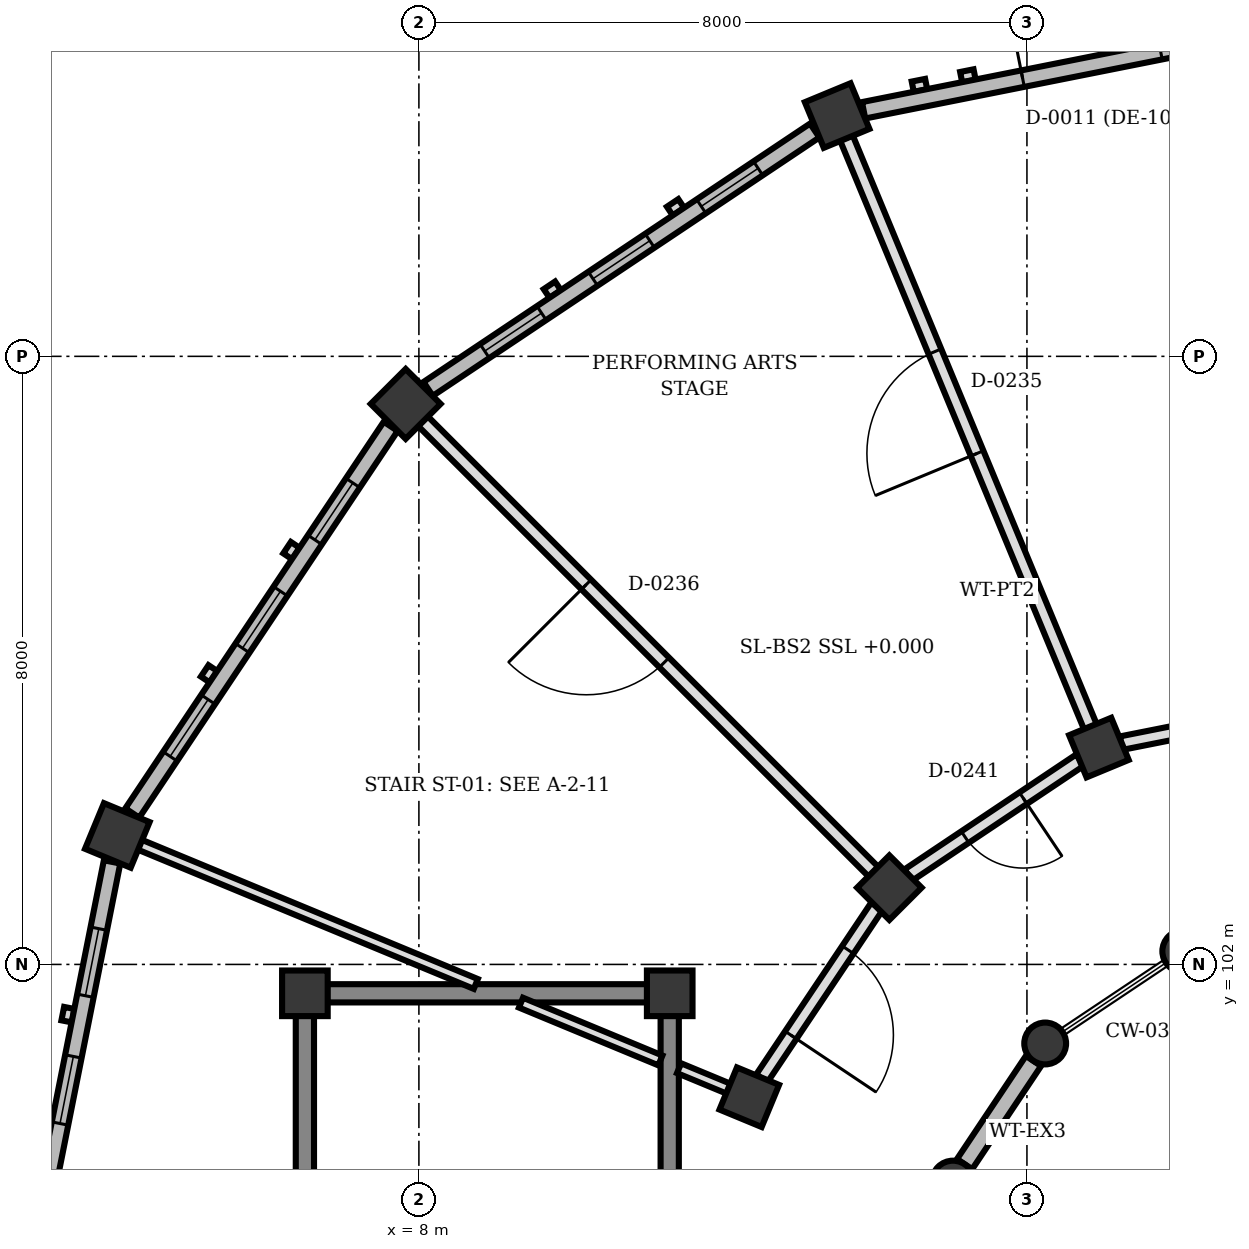
"""IFC4 building model, lengths in metres.
Left out: names, types, materials, properties, quantities, classifications, styles, units other than length and angle.
Written with IfcOpenShell. Run it as: python <this file> out.ifc"""

import sys

from ifc_helpers import new_model, si_unit, direction, frame, frame_2d, origin, origin_2d, place, context, subcontext, project, spatial, rectangle, circle, extrude, element, fill, save


model = new_model("IFC4")
c1 = context("Model", 3, precision=1e-05, world=origin(), true_north=direction((0.0, 1.0)))
c2 = subcontext(c1, "Body", "Model", "MODEL_VIEW")
j1 = project(units=[si_unit("LENGTHUNIT", "METRE"), si_unit("PLANEANGLEUNIT", "RADIAN")], contexts=[c1])
p1 = place(None, origin())
s1 = spatial("IfcSite", under=j1, at=p1, CompositionType="ELEMENT")
p2 = place(p1, origin())
s2 = spatial("IfcBuilding", under=s1, at=p2, CompositionType="ELEMENT")
p3 = place(p2, origin())
s3 = spatial("IfcBuildingStorey", under=s2, at=p3, CompositionType="ELEMENT", Elevation=0.0)
for number, where, z_axis, x_axis in (
    (1, (11.3, 101.62, 0.0), (0.0, 0.0, 1.0), (1.0, 0.0, 0.0)),
    (2, (6.5, 101.62, 0.0), (0.0, 0.0, 1.0), (1.0, 0.0, 0.0)),
):
    element("IfcColumn", number, at=place(p3, frame(where, z_axis=z_axis, x_axis=x_axis)), inside=s3, PredefinedType="COLUMN", context=c2, shape_type="SweptSolid", body=[
        extrude(rectangle(XDim=0.6, YDim=0.6, at=origin_2d()), origin(), (0.0, 0.0, 1.0), 4.5),
    ])
for number, where, z_axis, x_axis in (
    (3, (18.057, 102.174, 0.0), (0.0, 0.0, 1.0), (1.0, 0.0, 0.0)),
    (4, (16.24, 100.96, 0.0), (0.0, 0.0, 1.0), (1.0, 0.0, 0.0)),
    (5, (15.026, 99.143, 0.0), (0.0, 0.0, 1.0), (1.0, 0.0, 0.0)),
):
    element("IfcColumn", number, at=place(p3, frame(where, z_axis=z_axis, x_axis=x_axis)), inside=s3, PredefinedType="COLUMN", context=c2, shape_type="SweptSolid", body=[
        extrude(circle(Radius=0.275, at=origin_2d()), origin(), (0.0, 0.0, 1.0), 4.5),
    ])
for number, where, z_axis, x_axis in (
    (6, (16.947, 104.853, 0.0), (0.0, 0.0, 1.0), (-0.383, 0.924, 0.0)),
    (7, (14.19, 103.01, 0.0), (0.0, 0.0, 1.0), (-0.707, 0.707, 0.0)),
    (8, (12.347, 100.253, 0.0), (0.0, 0.0, 1.0), (-0.924, 0.383, 0.0)),
):
    element("IfcColumn", number, at=place(p3, frame(where, z_axis=z_axis, x_axis=x_axis)), inside=s3, PredefinedType="COLUMN", context=c2, shape_type="SweptSolid", body=[
        extrude(rectangle(XDim=0.6, YDim=0.6, at=origin_2d()), origin(), (0.0, 0.0, 1.0), 4.5),
    ])
for number, where, z_axis, x_axis in (
    (9, (13.503, 113.168, 0.0), (0.0, 0.0, 1.0), (-0.383, 0.924, 0.0)),
    (10, (7.826, 109.374, 0.0), (0.0, 0.0, 1.0), (-0.707, 0.707, 0.0)),
    (11, (4.032, 103.697, 0.0), (0.0, 0.0, 1.0), (-0.924, 0.383, 0.0)),
):
    element("IfcColumn", number, at=place(p3, frame(where, z_axis=z_axis, x_axis=x_axis)), inside=s3, PredefinedType="COLUMN", context=c2, shape_type="SweptSolid", body=[
        extrude(rectangle(XDim=0.65, YDim=0.65, at=origin_2d()), origin(), (0.0, 0.0, 1.0), 4.5),
    ])
p4 = place(p3, frame((13.851, 113.237, 0.0), z_axis=(0.0, 0.0, 1.0), x_axis=(0.98077967596, 0.19511849534, 0.0)))
e12 = element("IfcWall", 12, at=p4, inside=s3, PredefinedType="SOLIDWALL", context=c2, shape_type="SweptSolid", body=[
    extrude(rectangle(XDim=6.119, YDim=0.22, at=frame_2d((3.059, 0.0))), origin(), (0.0, 0.0, 1.0), 3.55),
])
p5 = place(p4, frame((2.134, 0.0, 0.0)))
e13 = element("IfcOpeningElement", 13, at=p5, cuts=e12, PredefinedType="OPENING", context=c2, shape_type="SweptSolid", body=[
    extrude(rectangle(XDim=1.85, YDim=2.35, at=frame_2d((0.925, 1.175))), frame((0.0, 0.12, 0.0), z_axis=(0.0, -1.0, 0.0), x_axis=(1.0, 0.0, 0.0)), (0.0, 0.0, 1.0), 0.24),
])
p6 = place(p3, frame((8.121, 109.571, 0.0), z_axis=(0.0, 0.0, 1.0), x_axis=(0.83139901156, 0.555675879967, 0.0)))
e14 = element("IfcWall", 14, at=p6, inside=s3, PredefinedType="SOLIDWALL", context=c2, shape_type="SweptSolid", body=[
    extrude(rectangle(XDim=6.118, YDim=0.22, at=frame_2d((3.059, 0.0))), origin(), (0.0, 0.0, 1.0), 3.55),
])
p7 = place(p6, frame((0.896, 0.0, 0.85)))
e15 = element("IfcOpeningElement", 15, at=p7, cuts=e14, PredefinedType="OPENING", context=c2, shape_type="SweptSolid", body=[
    extrude(rectangle(XDim=0.9, YDim=1.4, at=frame_2d((0.45, 0.7))), frame((0.0, 0.12, 0.0), z_axis=(0.0, -1.0, 0.0), x_axis=(1.0, 0.0, 0.0)), (0.0, 0.0, 1.0), 0.24),
])
p8 = place(p6, frame((2.609, 0.0, 0.85)))
e16 = element("IfcOpeningElement", 16, at=p8, cuts=e14, PredefinedType="OPENING", context=c2, shape_type="SweptSolid", body=[
    extrude(rectangle(XDim=0.9, YDim=1.4, at=frame_2d((0.45, 0.7))), frame((0.0, 0.12, 0.0), z_axis=(0.0, -1.0, 0.0), x_axis=(1.0, 0.0, 0.0)), (0.0, 0.0, 1.0), 0.24),
])
p9 = place(p6, frame((4.323, 0.0, 0.85)))
e17 = element("IfcOpeningElement", 17, at=p9, cuts=e14, PredefinedType="OPENING", context=c2, shape_type="SweptSolid", body=[
    extrude(rectangle(XDim=0.9, YDim=1.4, at=frame_2d((0.45, 0.7))), frame((0.0, 0.12, 0.0), z_axis=(0.0, -1.0, 0.0), x_axis=(1.0, 0.0, 0.0)), (0.0, 0.0, 1.0), 0.24),
])
p10 = place(p3, frame((4.229, 103.992, 0.0), z_axis=(0.0, 0.0, 1.0), x_axis=(0.555657446161, 0.831411331728, 0.0)))
e18 = element("IfcWall", 18, at=p10, inside=s3, PredefinedType="SOLIDWALL", context=c2, shape_type="SweptSolid", body=[
    extrude(rectangle(XDim=6.119, YDim=0.22, at=frame_2d((3.059, 0.0))), origin(), (0.0, 0.0, 1.0), 3.55),
])
p11 = place(p10, frame((0.896, 0.0, 0.85)))
e19 = element("IfcOpeningElement", 19, at=p11, cuts=e18, PredefinedType="OPENING", context=c2, shape_type="SweptSolid", body=[
    extrude(rectangle(XDim=0.9, YDim=1.4, at=frame_2d((0.45, 0.7))), frame((0.0, 0.12, 0.0), z_axis=(0.0, -1.0, 0.0), x_axis=(1.0, 0.0, 0.0)), (0.0, 0.0, 1.0), 0.24),
])
p12 = place(p10, frame((2.609, 0.0, 0.85)))
e20 = element("IfcOpeningElement", 20, at=p12, cuts=e18, PredefinedType="OPENING", context=c2, shape_type="SweptSolid", body=[
    extrude(rectangle(XDim=0.9, YDim=1.4, at=frame_2d((0.45, 0.7))), frame((0.0, 0.12, 0.0), z_axis=(0.0, -1.0, 0.0), x_axis=(1.0, 0.0, 0.0)), (0.0, 0.0, 1.0), 0.24),
])
p13 = place(p10, frame((4.323, 0.0, 0.85)))
e21 = element("IfcOpeningElement", 21, at=p13, cuts=e18, PredefinedType="OPENING", context=c2, shape_type="SweptSolid", body=[
    extrude(rectangle(XDim=0.9, YDim=1.4, at=frame_2d((0.45, 0.7))), frame((0.0, 0.12, 0.0), z_axis=(0.0, -1.0, 0.0), x_axis=(1.0, 0.0, 0.0)), (0.0, 0.0, 1.0), 0.24),
])
p14 = place(p3, frame((16.086, 100.73, 0.0), z_axis=(0.0, 0.0, 1.0), x_axis=(-0.555287078904, -0.83165874011, 0.0)))
e22 = element("IfcWall", 22, at=p14, inside=s3, PredefinedType="SOLIDWALL", context=c2, shape_type="SweptSolid", body=[
    extrude(rectangle(XDim=1.632, YDim=0.24, at=frame_2d((0.816, 0.0))), origin(), (0.0, 0.0, 1.0), 3.55),
])
p15 = place(p3, frame((2.769, 97.348, 0.0), z_axis=(0.0, 0.0, 1.0), x_axis=(0.195110859746, 0.980781194971, 0.0)))
e23 = element("IfcWall", 23, at=p15, inside=s3, PredefinedType="SOLIDWALL", context=c2, shape_type="SweptSolid", body=[
    extrude(rectangle(XDim=6.119, YDim=0.22, at=frame_2d((3.06, 0.0))), origin(), (0.0, 0.0, 1.0), 3.55),
])
p16 = place(p15, frame((0.896, 0.0, 0.85)))
e24 = element("IfcOpeningElement", 24, at=p16, cuts=e23, PredefinedType="OPENING", context=c2, shape_type="SweptSolid", body=[
    extrude(rectangle(XDim=0.9, YDim=1.4, at=frame_2d((0.45, 0.7))), frame((0.0, 0.12, 0.0), z_axis=(0.0, -1.0, 0.0), x_axis=(1.0, 0.0, 0.0)), (0.0, 0.0, 1.0), 0.24),
])
p17 = place(p15, frame((2.609, 0.0, 0.85)))
e25 = element("IfcOpeningElement", 25, at=p17, cuts=e23, PredefinedType="OPENING", context=c2, shape_type="SweptSolid", body=[
    extrude(rectangle(XDim=0.9, YDim=1.4, at=frame_2d((0.45, 0.7))), frame((0.0, 0.12, 0.0), z_axis=(0.0, -1.0, 0.0), x_axis=(1.0, 0.0, 0.0)), (0.0, 0.0, 1.0), 0.24),
])
p18 = place(p15, frame((4.323, 0.0, 0.85)))
e26 = element("IfcOpeningElement", 26, at=p18, cuts=e23, PredefinedType="OPENING", context=c2, shape_type="SweptSolid", body=[
    extrude(rectangle(XDim=0.9, YDim=1.4, at=frame_2d((0.45, 0.7))), frame((0.0, 0.12, 0.0), z_axis=(0.0, -1.0, 0.0), x_axis=(1.0, 0.0, 0.0)), (0.0, 0.0, 1.0), 0.24),
])
p19 = place(p3, frame((6.5, 93.192, 0.0), z_axis=(0.0, 0.0, 1.0), x_axis=(0.0, 1.0, 0.0)))
e27 = element("IfcWall", 27, at=p19, inside=s3, PredefinedType="SHEAR", context=c2, shape_type="SweptSolid", body=[
    extrude(rectangle(XDim=8.136, YDim=0.24, at=frame_2d((4.068, 0.0))), origin(), (0.0, 0.0, 1.0), 4.24),
])
p20 = place(p3, frame((11.3, 101.328, 0.0), z_axis=(0.0, 0.0, 1.0), x_axis=(0.0, -1.0, 0.0)))
e28 = element("IfcWall", 28, at=p20, inside=s3, PredefinedType="SHEAR", context=c2, shape_type="SweptSolid", body=[
    extrude(rectangle(XDim=8.136, YDim=0.24, at=frame_2d((4.068, 0.0))), origin(), (0.0, 0.0, 1.0), 4.24),
])
p21 = place(p20, frame((6.244, 0.0, 0.0)))
e29 = element("IfcOpeningElement", 29, at=p21, cuts=e28, PredefinedType="OPENING", context=c2, shape_type="SweptSolid", body=[
    extrude(rectangle(XDim=0.88, YDim=2.1, at=frame_2d((0.44, 1.05))), frame((0.0, 0.13, 0.0), z_axis=(0.0, -1.0, 0.0), x_axis=(1.0, 0.0, 0.0)), (0.0, 0.0, 1.0), 0.26),
])
p22 = place(p3, frame((11.008, 101.62, 0.0), z_axis=(0.0, 0.0, 1.0), x_axis=(-1.0, 0.0, 0.0)))
e30 = element("IfcWall", 30, at=p22, inside=s3, PredefinedType="SHEAR", context=c2, shape_type="SweptSolid", body=[
    extrude(rectangle(XDim=4.216, YDim=0.24, at=frame_2d((2.108, 0.0))), origin(), (0.0, 0.0, 1.0), 4.24),
])
p23 = place(p3, frame((16.836, 105.123, 0.0), z_axis=(0.0, 0.0, 1.0), x_axis=(-0.382780060664, 0.923839501839, 0.0)))
e31 = element("IfcWall", 31, at=p23, inside=s3, PredefinedType="PARTITIONING", context=c2, shape_type="SweptSolid", body=[
    extrude(rectangle(XDim=8.391, YDim=0.18, at=frame_2d((4.196, 0.0))), origin(), (0.0, 0.0, 1.0), 3.552),
])
p24 = place(p23, frame((3.897, 0.0, 0.0)))
e32 = element("IfcOpeningElement", 32, at=p24, cuts=e31, PredefinedType="OPENING", context=c2, shape_type="SweptSolid", body=[
    extrude(rectangle(XDim=1.45, YDim=2.2, at=frame_2d((0.725, 1.1))), frame((0.0, 0.1, 0.0), z_axis=(0.0, -1.0, 0.0), x_axis=(1.0, 0.0, 0.0)), (0.0, 0.0, 1.0), 0.2),
])
p25 = place(p3, frame((13.984, 103.216, 0.0), z_axis=(0.0, 0.0, 1.0), x_axis=(-0.707106781187, 0.707106781187, 0.0)))
e33 = element("IfcWall", 33, at=p25, inside=s3, PredefinedType="PARTITIONING", context=c2, shape_type="SweptSolid", body=[
    extrude(rectangle(XDim=8.392, YDim=0.18, at=frame_2d((4.196, 0.0))), origin(), (0.0, 0.0, 1.0), 3.552),
])
p26 = place(p25, frame((3.898, 0.0, 0.0)))
e34 = element("IfcOpeningElement", 34, at=p26, cuts=e33, PredefinedType="OPENING", context=c2, shape_type="SweptSolid", body=[
    extrude(rectangle(XDim=1.45, YDim=2.2, at=frame_2d((0.725, 1.1))), frame((0.0, 0.1, 0.0), z_axis=(0.0, -1.0, 0.0), x_axis=(1.0, 0.0, 0.0)), (0.0, 0.0, 1.0), 0.2),
])
p27 = place(p3, frame((12.077, 100.364, 0.0), z_axis=(0.0, 0.0, 1.0), x_axis=(-0.923789734747, 0.382900151445, 0.0)))
e35 = element("IfcWall", 35, at=p27, inside=s3, PredefinedType="PARTITIONING", context=c2, shape_type="SweptSolid", body=[
    extrude(rectangle(XDim=0.708, YDim=0.14, at=frame_2d((0.354, 0.0))), origin(), (0.0, 0.0, 1.0), 4.2),
])
p28 = place(p3, frame((11.177, 100.737, 0.0), z_axis=(0.0, 0.0, 1.0), x_axis=(-0.923817443679, 0.382833293686, 0.0)))
e36 = element("IfcWall", 36, at=p28, inside=s3, PredefinedType="PARTITIONING", context=c2, shape_type="SweptSolid", body=[
    extrude(rectangle(XDim=1.985, YDim=0.14, at=frame_2d((0.993, 0.0))), origin(), (0.0, 0.0, 1.0), 4.2),
])
p29 = place(p3, frame((8.749, 101.743, 0.0), z_axis=(0.0, 0.0, 1.0), x_axis=(-0.923842829076, 0.38277203028, 0.0)))
e37 = element("IfcWall", 37, at=p29, inside=s3, PredefinedType="PARTITIONING", context=c2, shape_type="SweptSolid", body=[
    extrude(rectangle(XDim=4.789, YDim=0.14, at=frame_2d((2.395, 0.0))), origin(), (0.0, 0.0, 1.0), 4.2),
])
p30 = place(p3, frame((19.908, 105.442, 0.0), z_axis=(0.0, 0.0, 1.0), x_axis=(-0.980776867939, -0.195132609565, 0.0)))
e38 = element("IfcWall", 38, at=p30, inside=s3, PredefinedType="PARTITIONING", context=c2, shape_type="SweptSolid", body=[
    extrude(rectangle(XDim=2.721, YDim=0.18, at=frame_2d((1.361, 0.0))), origin(), (0.0, 0.0, 1.0), 3.552),
])
p31 = place(p30, frame((0.686, 0.0, 0.0)))
e39 = element("IfcOpeningElement", 39, at=p31, cuts=e38, PredefinedType="OPENING", context=c2, shape_type="SweptSolid", body=[
    extrude(rectangle(XDim=1.35, YDim=2.2, at=frame_2d((0.675, 1.1))), frame((0.0, 0.1, 0.0), z_axis=(0.0, -1.0, 0.0), x_axis=(1.0, 0.0, 0.0)), (0.0, 0.0, 1.0), 0.2),
])
p32 = place(p3, frame((16.699, 104.688, 0.0), z_axis=(0.0, 0.0, 1.0), x_axis=(-0.831096426298, -0.556128339679, 0.0)))
e40 = element("IfcWall", 40, at=p32, inside=s3, PredefinedType="PARTITIONING", context=c2, shape_type="SweptSolid", body=[
    extrude(rectangle(XDim=2.72, YDim=0.18, at=frame_2d((1.36, 0.0))), origin(), (0.0, 0.0, 1.0), 3.552),
])
p33 = place(p32, frame((0.9, 0.0, 0.0)))
e41 = element("IfcOpeningElement", 41, at=p33, cuts=e40, PredefinedType="OPENING", context=c2, shape_type="SweptSolid", body=[
    extrude(rectangle(XDim=0.92, YDim=2.1, at=frame_2d((0.46, 1.05))), frame((0.0, 0.1, 0.0), z_axis=(0.0, -1.0, 0.0), x_axis=(1.0, 0.0, 0.0)), (0.0, 0.0, 1.0), 0.2),
])
p34 = place(p3, frame((14.025, 102.762, 0.0), z_axis=(0.0, 0.0, 1.0), x_axis=(-0.556128339679, -0.831096426298, 0.0)))
e42 = element("IfcWall", 42, at=p34, inside=s3, PredefinedType="PARTITIONING", context=c2, shape_type="SweptSolid", body=[
    extrude(rectangle(XDim=2.72, YDim=0.18, at=frame_2d((1.36, 0.0))), origin(), (0.0, 0.0, 1.0), 3.552),
])
p35 = place(p34, frame((0.685, 0.0, 0.0)))
e43 = element("IfcOpeningElement", 43, at=p35, cuts=e42, PredefinedType="OPENING", context=c2, shape_type="SweptSolid", body=[
    extrude(rectangle(XDim=1.35, YDim=2.2, at=frame_2d((0.675, 1.1))), frame((0.0, 0.1, 0.0), z_axis=(0.0, -1.0, 0.0), x_axis=(1.0, 0.0, 0.0)), (0.0, 0.0, 1.0), 0.2),
])
p36 = place(p5, origin())
e44 = element("IfcDoor", 44, at=p36, inside=s3, OperationType="SINGLE_SWING_LEFT", PredefinedType="DOOR", context=c2, shape_type="SweptSolid", body=[
    extrude(rectangle(XDim=1.85, YDim=2.35, at=frame_2d((0.925, 1.175))), frame((0.0, 0.025, 0.0), z_axis=(0.0, -1.0, 0.0), x_axis=(1.0, 0.0, 0.0)), (0.0, 0.0, 1.0), 0.05),
])
fill(e13, e44)
p37 = place(p7, origin())
e45 = element("IfcWindow", 45, at=p37, inside=s3, PartitioningType="SINGLE_PANEL", PredefinedType="WINDOW", context=c2, shape_type="SweptSolid", body=[
    extrude(rectangle(XDim=0.9, YDim=1.4, at=frame_2d((0.45, 0.7))), frame((0.0, 0.03, 0.0), z_axis=(0.0, -1.0, 0.0), x_axis=(1.0, 0.0, 0.0)), (0.0, 0.0, 1.0), 0.06),
])
fill(e15, e45)
p38 = place(p8, origin())
e46 = element("IfcWindow", 46, at=p38, inside=s3, PartitioningType="SINGLE_PANEL", PredefinedType="WINDOW", context=c2, shape_type="SweptSolid", body=[
    extrude(rectangle(XDim=0.9, YDim=1.4, at=frame_2d((0.45, 0.7))), frame((0.0, 0.03, 0.0), z_axis=(0.0, -1.0, 0.0), x_axis=(1.0, 0.0, 0.0)), (0.0, 0.0, 1.0), 0.06),
])
fill(e16, e46)
p39 = place(p9, origin())
e47 = element("IfcWindow", 47, at=p39, inside=s3, PartitioningType="SINGLE_PANEL", PredefinedType="WINDOW", context=c2, shape_type="SweptSolid", body=[
    extrude(rectangle(XDim=0.9, YDim=1.4, at=frame_2d((0.45, 0.7))), frame((0.0, 0.03, 0.0), z_axis=(0.0, -1.0, 0.0), x_axis=(1.0, 0.0, 0.0)), (0.0, 0.0, 1.0), 0.06),
])
fill(e17, e47)
p40 = place(p11, origin())
e48 = element("IfcWindow", 48, at=p40, inside=s3, PartitioningType="SINGLE_PANEL", PredefinedType="WINDOW", context=c2, shape_type="SweptSolid", body=[
    extrude(rectangle(XDim=0.9, YDim=1.4, at=frame_2d((0.45, 0.7))), frame((0.0, 0.03, 0.0), z_axis=(0.0, -1.0, 0.0), x_axis=(1.0, 0.0, 0.0)), (0.0, 0.0, 1.0), 0.06),
])
fill(e19, e48)
p41 = place(p12, origin())
e49 = element("IfcWindow", 49, at=p41, inside=s3, PartitioningType="SINGLE_PANEL", PredefinedType="WINDOW", context=c2, shape_type="SweptSolid", body=[
    extrude(rectangle(XDim=0.9, YDim=1.4, at=frame_2d((0.45, 0.7))), frame((0.0, 0.03, 0.0), z_axis=(0.0, -1.0, 0.0), x_axis=(1.0, 0.0, 0.0)), (0.0, 0.0, 1.0), 0.06),
])
fill(e20, e49)
p42 = place(p13, origin())
e50 = element("IfcWindow", 50, at=p42, inside=s3, PartitioningType="SINGLE_PANEL", PredefinedType="WINDOW", context=c2, shape_type="SweptSolid", body=[
    extrude(rectangle(XDim=0.9, YDim=1.4, at=frame_2d((0.45, 0.7))), frame((0.0, 0.03, 0.0), z_axis=(0.0, -1.0, 0.0), x_axis=(1.0, 0.0, 0.0)), (0.0, 0.0, 1.0), 0.06),
])
fill(e21, e50)
p43 = place(p17, origin())
e51 = element("IfcWindow", 51, at=p43, inside=s3, PartitioningType="SINGLE_PANEL", PredefinedType="WINDOW", context=c2, shape_type="SweptSolid", body=[
    extrude(rectangle(XDim=0.9, YDim=1.4, at=frame_2d((0.45, 0.7))), frame((0.0, 0.03, 0.0), z_axis=(0.0, -1.0, 0.0), x_axis=(1.0, 0.0, 0.0)), (0.0, 0.0, 1.0), 0.06),
])
fill(e25, e51)
p44 = place(p18, origin())
e52 = element("IfcWindow", 52, at=p44, inside=s3, PartitioningType="SINGLE_PANEL", PredefinedType="WINDOW", context=c2, shape_type="SweptSolid", body=[
    extrude(rectangle(XDim=0.9, YDim=1.4, at=frame_2d((0.45, 0.7))), frame((0.0, 0.03, 0.0), z_axis=(0.0, -1.0, 0.0), x_axis=(1.0, 0.0, 0.0)), (0.0, 0.0, 1.0), 0.06),
])
fill(e26, e52)
p45 = place(p24, origin())
e53 = element("IfcDoor", 53, at=p45, inside=s3, OperationType="SINGLE_SWING_LEFT", PredefinedType="DOOR", context=c2, shape_type="SweptSolid", body=[
    extrude(rectangle(XDim=1.45, YDim=2.2, at=frame_2d((0.725, 1.1))), frame((0.0, 0.025, 0.0), z_axis=(0.0, -1.0, 0.0), x_axis=(1.0, 0.0, 0.0)), (0.0, 0.0, 1.0), 0.05),
])
fill(e32, e53)
p46 = place(p26, origin())
e54 = element("IfcDoor", 54, at=p46, inside=s3, OperationType="SINGLE_SWING_RIGHT", PredefinedType="DOOR", context=c2, shape_type="SweptSolid", body=[
    extrude(rectangle(XDim=1.45, YDim=2.2, at=frame_2d((0.725, 1.1))), frame((0.0, 0.025, 0.0), z_axis=(0.0, -1.0, 0.0), x_axis=(1.0, 0.0, 0.0)), (0.0, 0.0, 1.0), 0.05),
])
fill(e34, e54)
p47 = place(p33, origin())
e55 = element("IfcDoor", 55, at=p47, inside=s3, OperationType="SINGLE_SWING_LEFT", PredefinedType="DOOR", context=c2, shape_type="SweptSolid", body=[
    extrude(rectangle(XDim=0.92, YDim=2.1, at=frame_2d((0.46, 1.05))), frame((0.0, 0.025, 0.0), z_axis=(0.0, -1.0, 0.0), x_axis=(1.0, 0.0, 0.0)), (0.0, 0.0, 1.0), 0.05),
])
fill(e41, e55)
p48 = place(p35, origin())
e56 = element("IfcDoor", 56, at=p48, inside=s3, OperationType="SINGLE_SWING_RIGHT", PredefinedType="DOOR", context=c2, shape_type="SweptSolid", body=[
    extrude(rectangle(XDim=1.35, YDim=2.2, at=frame_2d((0.675, 1.1))), frame((0.0, 0.025, 0.0), z_axis=(0.0, -1.0, 0.0), x_axis=(1.0, 0.0, 0.0)), (0.0, 0.0, 1.0), 0.05),
])
fill(e43, e56)
save(model, sys.argv[1])
